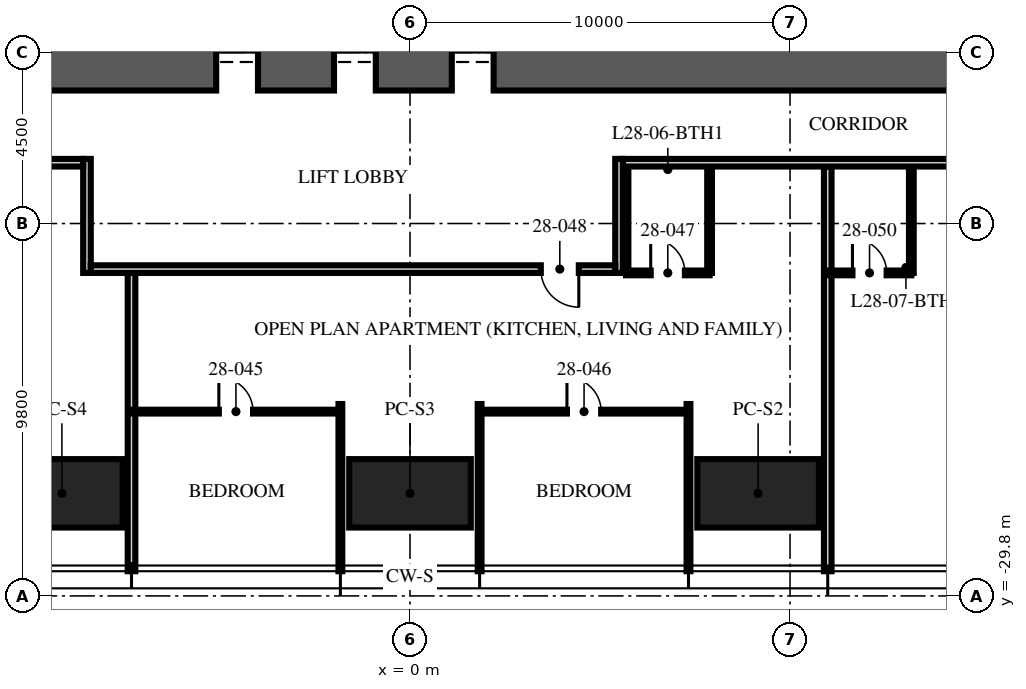
"""IFC4 building model, lengths in metres.
Left out: names, types, materials, properties, quantities, classifications, styles, units other than length and angle.
Written with IfcOpenShell. Run it as: python <this file> out.ifc"""

import sys

from ifc_helpers import new_model, si_unit, direction, frame, frame_2d, origin, origin_2d, place, context, subcontext, project, spatial, rectangle, hollow_rectangle, extrude, element, fill, save


model = new_model("IFC4")
c1 = context("Model", 3, precision=1e-05, world=origin(), true_north=direction((0.0, 1.0)))
c2 = subcontext(c1, "Body", "Model", "MODEL_VIEW")
j1 = project(units=[si_unit("LENGTHUNIT", "METRE"), si_unit("PLANEANGLEUNIT", "RADIAN")], contexts=[c1])
p1 = place(None, origin())
s1 = spatial("IfcSite", under=j1, at=p1, CompositionType="ELEMENT")
p2 = place(p1, origin())
s2 = spatial("IfcBuilding", under=s1, at=p2, CompositionType="ELEMENT")
p3 = place(p2, frame((0.0, 0.0, 114.75)))
s3 = spatial("IfcBuildingStorey", under=s2, at=p3, CompositionType="ELEMENT", Elevation=114.75)
p4 = place(p3, frame((-15.5, -15.5, -0.25), z_axis=(0.0, 0.0, 1.0), x_axis=(1.0, 0.0, 0.0)))
e1 = element("IfcWall", 1, at=p4, inside=s3, PredefinedType="SHEAR", context=c2, shape_type="SweptSolid", body=[
    extrude(rectangle(XDim=31.0, YDim=2.0, at=frame_2d((15.5, 0.0))), origin(), (0.0, 0.0, 1.0), 3.75),
])
p5 = place(p4, frame((10.4, 0.0, 0.25)))
e2 = element("IfcOpeningElement", 2, at=p5, cuts=e1, PredefinedType="OPENING", context=c2, shape_type="SweptSolid", body=[
    extrude(rectangle(XDim=1.1, YDim=2.1, at=frame_2d((0.55, 1.05))), frame((0.0, 1.01, 0.0), z_axis=(0.0, -1.0, 0.0), x_axis=(1.0, 0.0, 0.0)), (0.0, 0.0, 1.0), 2.02),
])
p6 = place(p4, frame((13.5, 0.0, 0.25)))
e3 = element("IfcOpeningElement", 3, at=p6, cuts=e1, PredefinedType="OPENING", context=c2, shape_type="SweptSolid", body=[
    extrude(rectangle(XDim=1.1, YDim=2.1, at=frame_2d((0.55, 1.05))), frame((0.0, 1.01, 0.0), z_axis=(0.0, -1.0, 0.0), x_axis=(1.0, 0.0, 0.0)), (0.0, 0.0, 1.0), 2.02),
])
p7 = place(p4, frame((16.6, 0.0, 0.25)))
e4 = element("IfcOpeningElement", 4, at=p7, cuts=e1, PredefinedType="OPENING", context=c2, shape_type="SweptSolid", body=[
    extrude(rectangle(XDim=1.1, YDim=2.1, at=frame_2d((0.55, 1.05))), frame((0.0, 1.01, 0.0), z_axis=(0.0, -1.0, 0.0), x_axis=(1.0, 0.0, 0.0)), (0.0, 0.0, 1.0), 2.02),
])
for number, where, z_axis, x_axis in (
    (5, (9.16, -27.1, 0.0), (0.0, 0.0, 1.0), (1.0, 0.0, 0.0)),
    (6, (0.0, -27.1, 0.0), (0.0, 0.0, 1.0), (1.0, 0.0, 0.0)),
    (7, (-9.16, -27.1, 0.0), (0.0, 0.0, 1.0), (1.0, 0.0, 0.0)),
):
    element("IfcColumn", number, at=place(p3, frame(where, z_axis=z_axis, x_axis=x_axis)), inside=s3, PredefinedType="COLUMN", context=c2, shape_type="SweptSolid", body=[
        extrude(hollow_rectangle(XDim=3.2, YDim=1.8, WallThickness=0.2, at=origin_2d()), origin(), (0.0, 0.0, 1.0), 3.75),
    ])
p8 = place(p3, frame((-7.328, -21.3, 0.0), z_axis=(0.0, 0.0, 1.0), x_axis=(0.0, -1.0, 0.0)))
e8 = element("IfcWall", 8, at=p8, inside=s3, PredefinedType="PARTITIONING", context=c2, shape_type="SweptSolid", body=[
    extrude(rectangle(XDim=7.85, YDim=0.2, at=frame_2d((3.925, 0.0))), origin(), (0.0, 0.0, 1.0), 2.81),
])
for number, where, z_axis, x_axis in (
    (9, (-1.832, -24.75, 0.0), (0.0, 0.0, 1.0), (0.0, -1.0, 0.0)),
    (10, (1.832, -24.75, 0.0), (0.0, 0.0, 1.0), (0.0, -1.0, 0.0)),
    (11, (7.328, -24.75, 0.0), (0.0, 0.0, 1.0), (0.0, -1.0, 0.0)),
):
    element("IfcWall", number, at=place(p3, frame(where, z_axis=z_axis, x_axis=x_axis)), inside=s3, PredefinedType="PARTITIONING", context=c2, shape_type="SweptSolid", body=[
        extrude(rectangle(XDim=4.4, YDim=0.1, at=frame_2d((2.2, 0.0))), origin(), (0.0, 0.0, 1.0), 2.81),
    ])
p9 = place(p3, frame((10.992, -18.5, 0.0), z_axis=(0.0, 0.0, 1.0), x_axis=(0.0, -1.0, 0.0)))
e12 = element("IfcWall", 12, at=p9, inside=s3, PredefinedType="PARTITIONING", context=c2, shape_type="SweptSolid", body=[
    extrude(rectangle(XDim=10.65, YDim=0.2, at=frame_2d((5.325, 0.0))), origin(), (0.0, 0.0, 1.0), 2.81),
])
p10 = place(p3, frame((-7.328, -24.95, 0.0), z_axis=(0.0, 0.0, 1.0), x_axis=(1.0, 0.0, 0.0)))
e13 = element("IfcWall", 13, at=p10, inside=s3, PredefinedType="PARTITIONING", context=c2, shape_type="SweptSolid", body=[
    extrude(rectangle(XDim=5.496, YDim=0.1, at=frame_2d((2.748, 0.0))), origin(), (0.0, 0.0, 1.0), 2.81),
])
p11 = place(p10, frame((2.298, 0.0, 0.0)))
e14 = element("IfcOpeningElement", 14, at=p11, cuts=e13, PredefinedType="OPENING", context=c2, shape_type="SweptSolid", body=[
    extrude(rectangle(XDim=0.9, YDim=2.1, at=frame_2d((0.45, 1.05))), frame((0.0, 0.06, 0.0), z_axis=(0.0, -1.0, 0.0), x_axis=(1.0, 0.0, 0.0)), (0.0, 0.0, 1.0), 0.12),
])
p12 = place(p3, frame((1.832, -24.95, 0.0), z_axis=(0.0, 0.0, 1.0), x_axis=(1.0, 0.0, 0.0)))
e15 = element("IfcWall", 15, at=p12, inside=s3, PredefinedType="PARTITIONING", context=c2, shape_type="SweptSolid", body=[
    extrude(rectangle(XDim=5.496, YDim=0.1, at=frame_2d((2.748, 0.0))), origin(), (0.0, 0.0, 1.0), 2.81),
])
p13 = place(p12, frame((2.298, 0.0, 0.0)))
e16 = element("IfcOpeningElement", 16, at=p13, cuts=e15, PredefinedType="OPENING", context=c2, shape_type="SweptSolid", body=[
    extrude(rectangle(XDim=0.9, YDim=2.1, at=frame_2d((0.45, 1.05))), frame((0.0, 0.06, 0.0), z_axis=(0.0, -1.0, 0.0), x_axis=(1.0, 0.0, 0.0)), (0.0, 0.0, 1.0), 0.12),
])
p14 = place(p3, frame((5.684, -21.3, 0.0), z_axis=(0.0, 0.0, 1.0), x_axis=(1.0, 0.0, 0.0)))
e17 = element("IfcWall", 17, at=p14, inside=s3, PredefinedType="PARTITIONING", context=c2, shape_type="SweptSolid", body=[
    extrude(rectangle(XDim=2.2, YDim=0.125, at=frame_2d((1.1, 0.0))), origin(), (0.0, 0.0, 1.0), 3.5),
])
p15 = place(p14, frame((0.65, 0.0, 0.0)))
e18 = element("IfcOpeningElement", 18, at=p15, cuts=e17, PredefinedType="OPENING", context=c2, shape_type="SweptSolid", body=[
    extrude(rectangle(XDim=0.9, YDim=2.1, at=frame_2d((0.45, 1.05))), frame((0.0, 0.073, 0.0), z_axis=(0.0, -1.0, 0.0), x_axis=(1.0, 0.0, 0.0)), (0.0, 0.0, 1.0), 0.145),
])
for number, where, z_axis, x_axis in (
    (19, (5.684, -18.5, 0.0), (0.0, 0.0, 1.0), (0.0, -1.0, 0.0)),
    (20, (7.884, -18.5, 0.0), (0.0, 0.0, 1.0), (0.0, -1.0, 0.0)),
):
    element("IfcWall", number, at=place(p3, frame(where, z_axis=z_axis, x_axis=x_axis)), inside=s3, PredefinedType="PARTITIONING", context=c2, shape_type="SweptSolid", body=[
        extrude(rectangle(XDim=2.8, YDim=0.125, at=frame_2d((1.4, 0.0))), origin(), (0.0, 0.0, 1.0), 3.5),
    ])
p16 = place(p3, frame((10.992, -21.3, 0.0), z_axis=(0.0, 0.0, 1.0), x_axis=(1.0, 0.0, 0.0)))
e21 = element("IfcWall", 21, at=p16, inside=s3, PredefinedType="PARTITIONING", context=c2, shape_type="SweptSolid", body=[
    extrude(rectangle(XDim=2.2, YDim=0.125, at=frame_2d((1.1, 0.0))), origin(), (0.0, 0.0, 1.0), 3.5),
])
p17 = place(p16, frame((0.65, 0.0, 0.0)))
e22 = element("IfcOpeningElement", 22, at=p17, cuts=e21, PredefinedType="OPENING", context=c2, shape_type="SweptSolid", body=[
    extrude(rectangle(XDim=0.9, YDim=2.1, at=frame_2d((0.45, 1.05))), frame((0.0, 0.073, 0.0), z_axis=(0.0, -1.0, 0.0), x_axis=(1.0, 0.0, 0.0)), (0.0, 0.0, 1.0), 0.145),
])
p18 = place(p3, frame((13.192, -18.5, 0.0), z_axis=(0.0, 0.0, 1.0), x_axis=(0.0, -1.0, 0.0)))
e23 = element("IfcWall", 23, at=p18, inside=s3, PredefinedType="PARTITIONING", context=c2, shape_type="SweptSolid", body=[
    extrude(rectangle(XDim=2.8, YDim=0.125, at=frame_2d((1.4, 0.0))), origin(), (0.0, 0.0, 1.0), 3.5),
])
p19 = place(p3, frame((18.5, -18.4, 0.0), z_axis=(0.0, 0.0, 1.0), x_axis=(-1.0, 0.0, 0.0)))
e24 = element("IfcWall", 24, at=p19, inside=s3, PredefinedType="PARTITIONING", context=c2, shape_type="SweptSolid", body=[
    extrude(rectangle(XDim=12.9, YDim=0.2, at=frame_2d((6.45, 0.0))), origin(), (0.0, 0.0, 1.0), 2.3),
])
for number, where, z_axis, x_axis in (
    (25, (5.5, -18.3, 0.0), (0.0, 0.0, 1.0), (0.0, -1.0, 0.0)),
    (26, (-8.5, -18.3, 0.0), (0.0, 0.0, 1.0), (0.0, -1.0, 0.0)),
):
    element("IfcWall", number, at=place(p3, frame(where, z_axis=z_axis, x_axis=x_axis)), inside=s3, PredefinedType="PARTITIONING", context=c2, shape_type="SweptSolid", body=[
        extrude(rectangle(XDim=3.0, YDim=0.2, at=frame_2d((1.5, 0.0))), origin(), (0.0, 0.0, 1.0), 3.5),
    ])
p20 = place(p3, frame((5.4, -21.2, 0.0), z_axis=(0.0, 0.0, 1.0), x_axis=(-1.0, 0.0, 0.0)))
e27 = element("IfcWall", 27, at=p20, inside=s3, PredefinedType="PARTITIONING", context=c2, shape_type="SweptSolid", body=[
    extrude(rectangle(XDim=13.8, YDim=0.2, at=frame_2d((6.9, 0.0))), origin(), (0.0, 0.0, 1.0), 2.7),
])
p21 = place(p20, frame((0.958, 0.0, 0.0)))
e28 = element("IfcOpeningElement", 28, at=p21, cuts=e27, PredefinedType="OPENING", context=c2, shape_type="SweptSolid", body=[
    extrude(rectangle(XDim=1.0, YDim=2.2, at=frame_2d((0.5, 1.1))), frame((0.0, 0.11, 0.0), z_axis=(0.0, -1.0, 0.0), x_axis=(1.0, 0.0, 0.0)), (0.0, 0.0, 1.0), 0.22),
])
p22 = place(p3, frame((-8.6, -18.4, 0.0), z_axis=(0.0, 0.0, 1.0), x_axis=(-1.0, 0.0, 0.0)))
e29 = element("IfcWall", 29, at=p22, inside=s3, PredefinedType="PARTITIONING", context=c2, shape_type="SweptSolid", body=[
    extrude(rectangle(XDim=9.9, YDim=0.2, at=frame_2d((4.95, 0.0))), origin(), (0.0, 0.0, 1.0), 2.3),
])
p23 = place(p5, origin())
e30 = element("IfcDoor", 30, at=p23, inside=s3, OperationType="DOUBLE_DOOR_SLIDING", PredefinedType="DOOR", context=c2, shape_type="SweptSolid", body=[
    extrude(rectangle(XDim=1.1, YDim=2.1, at=frame_2d((0.55, 1.05))), frame((0.0, 0.025, 0.0), z_axis=(0.0, -1.0, 0.0), x_axis=(1.0, 0.0, 0.0)), (0.0, 0.0, 1.0), 0.05),
])
fill(e2, e30)
p24 = place(p6, origin())
e31 = element("IfcDoor", 31, at=p24, inside=s3, OperationType="DOUBLE_DOOR_SLIDING", PredefinedType="DOOR", context=c2, shape_type="SweptSolid", body=[
    extrude(rectangle(XDim=1.1, YDim=2.1, at=frame_2d((0.55, 1.05))), frame((0.0, 0.025, 0.0), z_axis=(0.0, -1.0, 0.0), x_axis=(1.0, 0.0, 0.0)), (0.0, 0.0, 1.0), 0.05),
])
fill(e3, e31)
p25 = place(p7, origin())
e32 = element("IfcDoor", 32, at=p25, inside=s3, OperationType="DOUBLE_DOOR_SLIDING", PredefinedType="DOOR", context=c2, shape_type="SweptSolid", body=[
    extrude(rectangle(XDim=1.1, YDim=2.1, at=frame_2d((0.55, 1.05))), frame((0.0, 0.025, 0.0), z_axis=(0.0, -1.0, 0.0), x_axis=(1.0, 0.0, 0.0)), (0.0, 0.0, 1.0), 0.05),
])
fill(e4, e32)
p26 = place(p11, origin())
e33 = element("IfcDoor", 33, at=p26, inside=s3, OperationType="SINGLE_SWING_LEFT", PredefinedType="DOOR", context=c2, shape_type="SweptSolid", body=[
    extrude(rectangle(XDim=0.9, YDim=2.1, at=frame_2d((0.45, 1.05))), frame((0.0, 0.025, 0.0), z_axis=(0.0, -1.0, 0.0), x_axis=(1.0, 0.0, 0.0)), (0.0, 0.0, 1.0), 0.05),
])
fill(e14, e33)
p27 = place(p13, origin())
e34 = element("IfcDoor", 34, at=p27, inside=s3, OperationType="SINGLE_SWING_LEFT", PredefinedType="DOOR", context=c2, shape_type="SweptSolid", body=[
    extrude(rectangle(XDim=0.9, YDim=2.1, at=frame_2d((0.45, 1.05))), frame((0.0, 0.025, 0.0), z_axis=(0.0, -1.0, 0.0), x_axis=(1.0, 0.0, 0.0)), (0.0, 0.0, 1.0), 0.05),
])
fill(e16, e34)
p28 = place(p15, origin())
e35 = element("IfcDoor", 35, at=p28, inside=s3, OperationType="SINGLE_SWING_LEFT", PredefinedType="DOOR", context=c2, shape_type="SweptSolid", body=[
    extrude(rectangle(XDim=0.9, YDim=2.1, at=frame_2d((0.45, 1.05))), frame((0.0, 0.025, 0.0), z_axis=(0.0, -1.0, 0.0), x_axis=(1.0, 0.0, 0.0)), (0.0, 0.0, 1.0), 0.05),
])
fill(e18, e35)
p29 = place(p21, origin())
e36 = element("IfcDoor", 36, at=p29, inside=s3, OperationType="SINGLE_SWING_LEFT", PredefinedType="DOOR", context=c2, shape_type="SweptSolid", body=[
    extrude(rectangle(XDim=1.0, YDim=2.2, at=frame_2d((0.5, 1.1))), frame((0.0, 0.025, 0.0), z_axis=(0.0, -1.0, 0.0), x_axis=(1.0, 0.0, 0.0)), (0.0, 0.0, 1.0), 0.05),
])
fill(e28, e36)
p30 = place(p17, origin())
e37 = element("IfcDoor", 37, at=p30, inside=s3, OperationType="SINGLE_SWING_LEFT", PredefinedType="DOOR", context=c2, shape_type="SweptSolid", body=[
    extrude(rectangle(XDim=0.9, YDim=2.1, at=frame_2d((0.45, 1.05))), frame((0.0, 0.025, 0.0), z_axis=(0.0, -1.0, 0.0), x_axis=(1.0, 0.0, 0.0)), (0.0, 0.0, 1.0), 0.05),
])
fill(e22, e37)
save(model, sys.argv[1])
